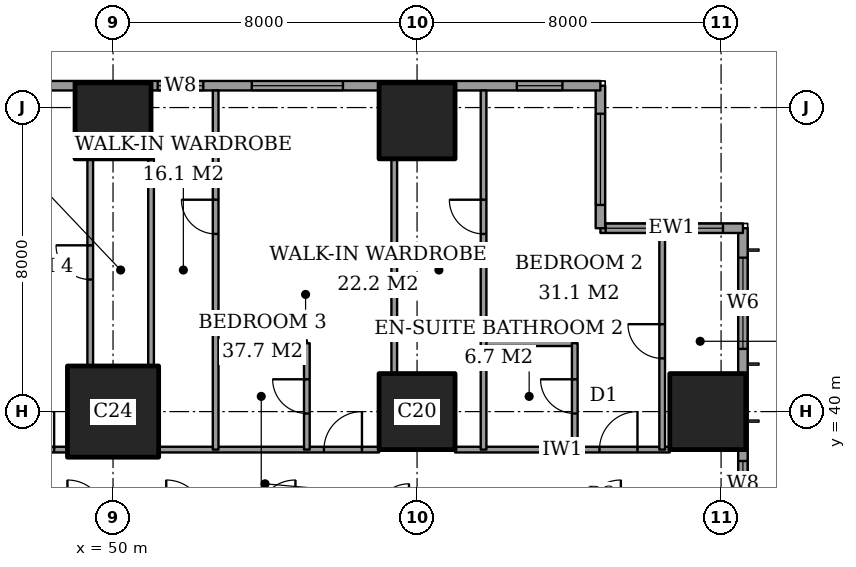
"""IFC4 building model, lengths in metres.
Left out: names, types, materials, properties, quantities, classifications, styles, units other than length and angle.
Written with IfcOpenShell. Run it as: python <this file> out.ifc"""

import sys

from ifc_helpers import new_model, si_unit, direction, frame, frame_2d, origin, origin_2d, place, context, subcontext, project, spatial, rectangle, extrude, element, fill, save


model = new_model("IFC4")
c1 = context("Model", 3, precision=1e-05, world=origin(), true_north=direction((0.0, 1.0)))
c2 = subcontext(c1, "Body", "Model", "MODEL_VIEW")
j1 = project(units=[si_unit("LENGTHUNIT", "METRE"), si_unit("PLANEANGLEUNIT", "RADIAN")], contexts=[c1])
p1 = place(None, origin())
s1 = spatial("IfcSite", under=j1, at=p1, CompositionType="ELEMENT")
p2 = place(p1, origin())
s2 = spatial("IfcBuilding", under=s1, at=p2, CompositionType="ELEMENT")
p3 = place(p2, frame((0.0, 0.0, 62.0)))
s3 = spatial("IfcBuildingStorey", under=s2, at=p3, CompositionType="ELEMENT", Elevation=62.0)
p4 = place(p3, frame((50.0, 40.0, 0.0), z_axis=(0.0, 0.0, 1.0), x_axis=(1.0, 0.0, 0.0)))
e1 = element("IfcColumn", 1, at=p4, inside=s3, PredefinedType="COLUMN", context=c2, shape_type="SweptSolid", body=[
    extrude(rectangle(XDim=2.4, YDim=2.4, at=origin_2d()), origin(), (0.0, 0.0, 1.0), 3.6),
])
for number, where, z_axis, x_axis in (
    (2, (50.0, 47.65, 0.0), (0.0, 0.0, 1.0), (1.0, 0.0, 0.0)),
    (3, (58.0, 40.0, 0.0), (0.0, 0.0, 1.0), (1.0, 0.0, 0.0)),
    (4, (58.0, 47.65, 0.0), (0.0, 0.0, 1.0), (1.0, 0.0, 0.0)),
    (5, (65.65, 40.0, 0.0), (0.0, 0.0, 1.0), (1.0, 0.0, 0.0)),
):
    element("IfcColumn", number, at=place(p3, frame(where, z_axis=z_axis, x_axis=x_axis)), inside=s3, PredefinedType="COLUMN", context=c2, shape_type="SweptSolid", body=[
        extrude(rectangle(XDim=2.0, YDim=2.0, at=origin_2d()), origin(), (0.0, 0.0, 1.0), 3.6),
    ])
p5 = place(p3, frame((66.575, 3.175, 0.0), z_axis=(0.0, 0.0, 1.0), x_axis=(0.0, 1.0, 0.0)))
e6 = element("IfcWall", 6, at=p5, inside=s3, PredefinedType="SOLIDWALL", context=c2, shape_type="SweptSolid", body=[
    extrude(rectangle(XDim=41.65, YDim=0.25, at=frame_2d((20.825, 0.0))), origin(), (0.0, 0.0, 1.0), 3.6),
])
p6 = place(p5, frame((0.775, 0.0, 0.6)))
e7 = element("IfcOpeningElement", 7, at=p6, cuts=e6, PredefinedType="OPENING", context=c2, shape_type="SweptSolid", body=[
    extrude(rectangle(XDim=2.4, YDim=2.0, at=frame_2d((1.2, 1.0))), frame((0.0, 0.135, 0.0), z_axis=(0.0, -1.0, 0.0), x_axis=(1.0, 0.0, 0.0)), (0.0, 0.0, 1.0), 0.27),
])
p7 = place(p5, frame((6.1, 0.0, 0.6)))
e8 = element("IfcOpeningElement", 8, at=p7, cuts=e6, PredefinedType="OPENING", context=c2, shape_type="SweptSolid", body=[
    extrude(rectangle(XDim=1.2, YDim=2.0, at=frame_2d((0.6, 1.0))), frame((0.0, 0.135, 0.0), z_axis=(0.0, -1.0, 0.0), x_axis=(1.0, 0.0, 0.0)), (0.0, 0.0, 1.0), 0.27),
])
p8 = place(p5, frame((8.275, 0.0, 0.6)))
e9 = element("IfcOpeningElement", 9, at=p8, cuts=e6, PredefinedType="OPENING", context=c2, shape_type="SweptSolid", body=[
    extrude(rectangle(XDim=2.4, YDim=2.0, at=frame_2d((1.2, 1.0))), frame((0.0, 0.135, 0.0), z_axis=(0.0, -1.0, 0.0), x_axis=(1.0, 0.0, 0.0)), (0.0, 0.0, 1.0), 0.27),
])
p9 = place(p5, frame((15.775, 0.0, 0.6)))
e10 = element("IfcOpeningElement", 10, at=p9, cuts=e6, PredefinedType="OPENING", context=c2, shape_type="SweptSolid", body=[
    extrude(rectangle(XDim=2.4, YDim=2.0, at=frame_2d((1.2, 1.0))), frame((0.0, 0.135, 0.0), z_axis=(0.0, -1.0, 0.0), x_axis=(1.0, 0.0, 0.0)), (0.0, 0.0, 1.0), 0.27),
])
p10 = place(p5, frame((23.475, 0.0, 0.6)))
e11 = element("IfcOpeningElement", 11, at=p10, cuts=e6, PredefinedType="OPENING", context=c2, shape_type="SweptSolid", body=[
    extrude(rectangle(XDim=2.4, YDim=2.0, at=frame_2d((1.2, 1.0))), frame((0.0, 0.135, 0.0), z_axis=(0.0, -1.0, 0.0), x_axis=(1.0, 0.0, 0.0)), (0.0, 0.0, 1.0), 0.27),
])
p11 = place(p5, frame((30.875, 0.0, 0.6)))
e12 = element("IfcOpeningElement", 12, at=p11, cuts=e6, PredefinedType="OPENING", context=c2, shape_type="SweptSolid", body=[
    extrude(rectangle(XDim=2.4, YDim=2.0, at=frame_2d((1.2, 1.0))), frame((0.0, 0.135, 0.0), z_axis=(0.0, -1.0, 0.0), x_axis=(1.0, 0.0, 0.0)), (0.0, 0.0, 1.0), 0.27),
])
p12 = place(p5, frame((34.325, 0.0, 0.6)))
e13 = element("IfcOpeningElement", 13, at=p12, cuts=e6, PredefinedType="OPENING", context=c2, shape_type="SweptSolid", body=[
    extrude(rectangle(XDim=1.2, YDim=2.0, at=frame_2d((0.6, 1.0))), frame((0.0, 0.135, 0.0), z_axis=(0.0, -1.0, 0.0), x_axis=(1.0, 0.0, 0.0)), (0.0, 0.0, 1.0), 0.27),
])
p13 = place(p5, frame((38.475, 0.0, 0.6)))
e14 = element("IfcOpeningElement", 14, at=p13, cuts=e6, PredefinedType="OPENING", context=c2, shape_type="SweptSolid", body=[
    extrude(rectangle(XDim=2.4, YDim=2.0, at=frame_2d((1.2, 1.0))), frame((0.0, 0.135, 0.0), z_axis=(0.0, -1.0, 0.0), x_axis=(1.0, 0.0, 0.0)), (0.0, 0.0, 1.0), 0.27),
])
p14 = place(p3, frame((66.575, 44.825, 0.0), z_axis=(0.0, 0.0, 1.0), x_axis=(-1.0, 0.0, 0.0)))
e15 = element("IfcWall", 15, at=p14, inside=s3, PredefinedType="SOLIDWALL", context=c2, shape_type="SweptSolid", body=[
    extrude(rectangle(XDim=3.75, YDim=0.25, at=frame_2d((1.875, 0.0))), origin(), (0.0, 0.0, 1.0), 3.6),
])
p15 = place(p14, frame((0.525, 0.0, 0.6)))
e16 = element("IfcOpeningElement", 16, at=p15, cuts=e15, PredefinedType="OPENING", context=c2, shape_type="SweptSolid", body=[
    extrude(rectangle(XDim=1.2, YDim=2.0, at=frame_2d((0.6, 1.0))), frame((0.0, 0.135, 0.0), z_axis=(0.0, -1.0, 0.0), x_axis=(1.0, 0.0, 0.0)), (0.0, 0.0, 1.0), 0.27),
])
p16 = place(p14, frame((2.413, 0.0, 0.6)))
e17 = element("IfcOpeningElement", 17, at=p16, cuts=e15, PredefinedType="OPENING", context=c2, shape_type="SweptSolid", body=[
    extrude(rectangle(XDim=1.2, YDim=2.0, at=frame_2d((0.6, 1.0))), frame((0.0, 0.135, 0.0), z_axis=(0.0, -1.0, 0.0), x_axis=(1.0, 0.0, 0.0)), (0.0, 0.0, 1.0), 0.27),
])
p17 = place(p3, frame((62.825, 44.825, 0.0), z_axis=(0.0, 0.0, 1.0), x_axis=(0.0, 1.0, 0.0)))
e18 = element("IfcWall", 18, at=p17, inside=s3, PredefinedType="SOLIDWALL", context=c2, shape_type="SweptSolid", body=[
    extrude(rectangle(XDim=3.75, YDim=0.25, at=frame_2d((1.875, 0.0))), origin(), (0.0, 0.0, 1.0), 3.6),
])
p18 = place(p17, frame((0.613, 0.0, 0.6)))
e19 = element("IfcOpeningElement", 19, at=p18, cuts=e18, PredefinedType="OPENING", context=c2, shape_type="SweptSolid", body=[
    extrude(rectangle(XDim=2.4, YDim=2.0, at=frame_2d((1.2, 1.0))), frame((0.0, 0.135, 0.0), z_axis=(0.0, -1.0, 0.0), x_axis=(1.0, 0.0, 0.0)), (0.0, 0.0, 1.0), 0.27),
])
p19 = place(p3, frame((62.825, 48.575, 0.0), z_axis=(0.0, 0.0, 1.0), x_axis=(-1.0, 0.0, 0.0)))
e20 = element("IfcWall", 20, at=p19, inside=s3, PredefinedType="SOLIDWALL", context=c2, shape_type="SweptSolid", body=[
    extrude(rectangle(XDim=21.4, YDim=0.25, at=frame_2d((10.7, 0.0))), origin(), (0.0, 0.0, 1.0), 3.6),
])
p20 = place(p19, frame((1.0, 0.0, 0.6)))
e21 = element("IfcOpeningElement", 21, at=p20, cuts=e20, PredefinedType="OPENING", context=c2, shape_type="SweptSolid", body=[
    extrude(rectangle(XDim=1.2, YDim=2.0, at=frame_2d((0.6, 1.0))), frame((0.0, 0.135, 0.0), z_axis=(0.0, -1.0, 0.0), x_axis=(1.0, 0.0, 0.0)), (0.0, 0.0, 1.0), 0.27),
])
p21 = place(p19, frame((6.775, 0.0, 0.6)))
e22 = element("IfcOpeningElement", 22, at=p21, cuts=e20, PredefinedType="OPENING", context=c2, shape_type="SweptSolid", body=[
    extrude(rectangle(XDim=2.4, YDim=2.0, at=frame_2d((1.2, 1.0))), frame((0.0, 0.135, 0.0), z_axis=(0.0, -1.0, 0.0), x_axis=(1.0, 0.0, 0.0)), (0.0, 0.0, 1.0), 0.27),
])
p22 = place(p19, frame((10.45, 0.0, 0.6)))
e23 = element("IfcOpeningElement", 23, at=p22, cuts=e20, PredefinedType="OPENING", context=c2, shape_type="SweptSolid", body=[
    extrude(rectangle(XDim=1.2, YDim=2.0, at=frame_2d((0.6, 1.0))), frame((0.0, 0.135, 0.0), z_axis=(0.0, -1.0, 0.0), x_axis=(1.0, 0.0, 0.0)), (0.0, 0.0, 1.0), 0.27),
])
p23 = place(p19, frame((14.475, 0.0, 0.6)))
e24 = element("IfcOpeningElement", 24, at=p23, cuts=e20, PredefinedType="OPENING", context=c2, shape_type="SweptSolid", body=[
    extrude(rectangle(XDim=2.4, YDim=2.0, at=frame_2d((1.2, 1.0))), frame((0.0, 0.135, 0.0), z_axis=(0.0, -1.0, 0.0), x_axis=(1.0, 0.0, 0.0)), (0.0, 0.0, 1.0), 0.27),
])
p24 = place(p19, frame((17.9, 0.0, 0.6)))
e25 = element("IfcOpeningElement", 25, at=p24, cuts=e20, PredefinedType="OPENING", context=c2, shape_type="SweptSolid", body=[
    extrude(rectangle(XDim=1.2, YDim=2.0, at=frame_2d((0.6, 1.0))), frame((0.0, 0.135, 0.0), z_axis=(0.0, -1.0, 0.0), x_axis=(1.0, 0.0, 0.0)), (0.0, 0.0, 1.0), 0.27),
])
p25 = place(p3, frame((43.35, 39.0, 0.0), z_axis=(0.0, 0.0, 1.0), x_axis=(1.0, 0.0, 0.0)))
e26 = element("IfcWall", 26, at=p25, inside=s3, PredefinedType="PARTITIONING", context=c2, shape_type="SweptSolid", body=[
    extrude(rectangle(XDim=5.45, YDim=0.15, at=frame_2d((2.725, 0.0))), origin(), (0.0, 0.0, 1.0), 3.35),
])
p26 = place(p25, frame((4.1, 0.0, 0.0)))
e27 = element("IfcOpeningElement", 27, at=p26, cuts=e26, PredefinedType="OPENING", context=c2, shape_type="SweptSolid", body=[
    extrude(rectangle(XDim=1.0, YDim=2.1, at=frame_2d((0.5, 1.05))), frame((0.0, 0.085, 0.0), z_axis=(0.0, -1.0, 0.0), x_axis=(1.0, 0.0, 0.0)), (0.0, 0.0, 1.0), 0.17),
])
p27 = place(p25, frame((0.475, 0.0, 0.0)))
e28 = element("IfcOpeningElement", 28, at=p27, cuts=e26, PredefinedType="OPENING", context=c2, shape_type="SweptSolid", body=[
    extrude(rectangle(XDim=1.0, YDim=2.1, at=frame_2d((0.5, 1.05))), frame((0.0, 0.085, 0.0), z_axis=(0.0, -1.0, 0.0), x_axis=(1.0, 0.0, 0.0)), (0.0, 0.0, 1.0), 0.17),
])
p28 = place(p3, frame((51.2, 39.0, 0.0), z_axis=(0.0, 0.0, 1.0), x_axis=(1.0, 0.0, 0.0)))
e29 = element("IfcWall", 29, at=p28, inside=s3, PredefinedType="PARTITIONING", context=c2, shape_type="SweptSolid", body=[
    extrude(rectangle(XDim=5.8, YDim=0.15, at=frame_2d((2.9, 0.0))), origin(), (0.0, 0.0, 1.0), 3.35),
])
p29 = place(p28, frame((4.35, 0.0, 0.0)))
e30 = element("IfcOpeningElement", 30, at=p29, cuts=e29, PredefinedType="OPENING", context=c2, shape_type="SweptSolid", body=[
    extrude(rectangle(XDim=1.0, YDim=2.1, at=frame_2d((0.5, 1.05))), frame((0.0, 0.085, 0.0), z_axis=(0.0, -1.0, 0.0), x_axis=(1.0, 0.0, 0.0)), (0.0, 0.0, 1.0), 0.17),
])
p30 = place(p3, frame((59.0, 39.0, 0.0), z_axis=(0.0, 0.0, 1.0), x_axis=(1.0, 0.0, 0.0)))
e31 = element("IfcWall", 31, at=p30, inside=s3, PredefinedType="PARTITIONING", context=c2, shape_type="SweptSolid", body=[
    extrude(rectangle(XDim=5.65, YDim=0.15, at=frame_2d((2.825, 0.0))), origin(), (0.0, 0.0, 1.0), 3.35),
])
p31 = place(p30, frame((3.8, 0.0, 0.0)))
e32 = element("IfcOpeningElement", 32, at=p31, cuts=e31, PredefinedType="OPENING", context=c2, shape_type="SweptSolid", body=[
    extrude(rectangle(XDim=1.0, YDim=2.1, at=frame_2d((0.5, 1.05))), frame((0.0, 0.085, 0.0), z_axis=(0.0, -1.0, 0.0), x_axis=(1.0, 0.0, 0.0)), (0.0, 0.0, 1.0), 0.17),
])
p32 = place(p3, frame((52.7, 41.8, 0.0), z_axis=(0.0, 0.0, 1.0), x_axis=(1.0, 0.0, 0.0)))
e33 = element("IfcWall", 33, at=p32, inside=s3, PredefinedType="PARTITIONING", context=c2, shape_type="SweptSolid", body=[
    extrude(rectangle(XDim=2.4, YDim=0.15, at=frame_2d((1.2, 0.0))), origin(), (0.0, 0.0, 1.0), 3.35),
])
p33 = place(p3, frame((59.75, 41.8, 0.0), z_axis=(0.0, 0.0, 1.0), x_axis=(1.0, 0.0, 0.0)))
e34 = element("IfcWall", 34, at=p33, inside=s3, PredefinedType="PARTITIONING", context=c2, shape_type="SweptSolid", body=[
    extrude(rectangle(XDim=2.4, YDim=0.15, at=frame_2d((1.2, 0.0))), origin(), (0.0, 0.0, 1.0), 3.35),
])
p34 = place(p3, frame((49.4, 41.2, 0.0), z_axis=(0.0, 0.0, 1.0), x_axis=(0.0, 1.0, 0.0)))
e35 = element("IfcWall", 35, at=p34, inside=s3, PredefinedType="PARTITIONING", context=c2, shape_type="SweptSolid", body=[
    extrude(rectangle(XDim=5.45, YDim=0.15, at=frame_2d((2.725, 0.0))), origin(), (0.0, 0.0, 1.0), 3.35),
])
p35 = place(p34, frame((2.275, 0.0, 0.0)))
e36 = element("IfcOpeningElement", 36, at=p35, cuts=e35, PredefinedType="OPENING", context=c2, shape_type="SweptSolid", body=[
    extrude(rectangle(XDim=0.9, YDim=2.1, at=frame_2d((0.45, 1.05))), frame((0.0, 0.085, 0.0), z_axis=(0.0, -1.0, 0.0), x_axis=(1.0, 0.0, 0.0)), (0.0, 0.0, 1.0), 0.17),
])
p36 = place(p3, frame((51.0, 41.2, 0.0), z_axis=(0.0, 0.0, 1.0), x_axis=(0.0, 1.0, 0.0)))
e37 = element("IfcWall", 37, at=p36, inside=s3, PredefinedType="PARTITIONING", context=c2, shape_type="SweptSolid", body=[
    extrude(rectangle(XDim=5.45, YDim=0.15, at=frame_2d((2.725, 0.0))), origin(), (0.0, 0.0, 1.0), 3.35),
])
p37 = place(p3, frame((52.7, 39.0, 0.0), z_axis=(0.0, 0.0, 1.0), x_axis=(0.0, 1.0, 0.0)))
e38 = element("IfcWall", 38, at=p37, inside=s3, PredefinedType="PARTITIONING", context=c2, shape_type="SweptSolid", body=[
    extrude(rectangle(XDim=9.45, YDim=0.15, at=frame_2d((4.725, 0.0))), origin(), (0.0, 0.0, 1.0), 3.35),
])
p38 = place(p37, frame((5.675, 0.0, 0.0)))
e39 = element("IfcOpeningElement", 39, at=p38, cuts=e38, PredefinedType="OPENING", context=c2, shape_type="SweptSolid", body=[
    extrude(rectangle(XDim=0.9, YDim=2.1, at=frame_2d((0.45, 1.05))), frame((0.0, 0.085, 0.0), z_axis=(0.0, -1.0, 0.0), x_axis=(1.0, 0.0, 0.0)), (0.0, 0.0, 1.0), 0.17),
])
p39 = place(p3, frame((55.1, 39.0, 0.0), z_axis=(0.0, 0.0, 1.0), x_axis=(0.0, 1.0, 0.0)))
e40 = element("IfcWall", 40, at=p39, inside=s3, PredefinedType="PARTITIONING", context=c2, shape_type="SweptSolid", body=[
    extrude(rectangle(XDim=2.8, YDim=0.15, at=frame_2d((1.4, 0.0))), origin(), (0.0, 0.0, 1.0), 3.35),
])
p40 = place(p39, frame((0.95, 0.0, 0.0)))
e41 = element("IfcOpeningElement", 41, at=p40, cuts=e40, PredefinedType="OPENING", context=c2, shape_type="SweptSolid", body=[
    extrude(rectangle(XDim=0.9, YDim=2.1, at=frame_2d((0.45, 1.05))), frame((0.0, 0.085, 0.0), z_axis=(0.0, -1.0, 0.0), x_axis=(1.0, 0.0, 0.0)), (0.0, 0.0, 1.0), 0.17),
])
p41 = place(p3, frame((57.4, 41.0, 0.0), z_axis=(0.0, 0.0, 1.0), x_axis=(0.0, 1.0, 0.0)))
e42 = element("IfcWall", 42, at=p41, inside=s3, PredefinedType="PARTITIONING", context=c2, shape_type="SweptSolid", body=[
    extrude(rectangle(XDim=5.65, YDim=0.15, at=frame_2d((2.825, 0.0))), origin(), (0.0, 0.0, 1.0), 3.35),
])
p42 = place(p3, frame((59.75, 39.0, 0.0), z_axis=(0.0, 0.0, 1.0), x_axis=(0.0, 1.0, 0.0)))
e43 = element("IfcWall", 43, at=p42, inside=s3, PredefinedType="PARTITIONING", context=c2, shape_type="SweptSolid", body=[
    extrude(rectangle(XDim=9.45, YDim=0.15, at=frame_2d((4.725, 0.0))), origin(), (0.0, 0.0, 1.0), 3.35),
])
p43 = place(p42, frame((5.675, 0.0, 0.0)))
e44 = element("IfcOpeningElement", 44, at=p43, cuts=e43, PredefinedType="OPENING", context=c2, shape_type="SweptSolid", body=[
    extrude(rectangle(XDim=0.9, YDim=2.1, at=frame_2d((0.45, 1.05))), frame((0.0, 0.085, 0.0), z_axis=(0.0, -1.0, 0.0), x_axis=(1.0, 0.0, 0.0)), (0.0, 0.0, 1.0), 0.17),
])
p44 = place(p3, frame((62.15, 39.0, 0.0), z_axis=(0.0, 0.0, 1.0), x_axis=(0.0, 1.0, 0.0)))
e45 = element("IfcWall", 45, at=p44, inside=s3, PredefinedType="PARTITIONING", context=c2, shape_type="SweptSolid", body=[
    extrude(rectangle(XDim=2.8, YDim=0.15, at=frame_2d((1.4, 0.0))), origin(), (0.0, 0.0, 1.0), 3.35),
])
p45 = place(p44, frame((0.95, 0.0, 0.0)))
e46 = element("IfcOpeningElement", 46, at=p45, cuts=e45, PredefinedType="OPENING", context=c2, shape_type="SweptSolid", body=[
    extrude(rectangle(XDim=0.9, YDim=2.1, at=frame_2d((0.45, 1.05))), frame((0.0, 0.085, 0.0), z_axis=(0.0, -1.0, 0.0), x_axis=(1.0, 0.0, 0.0)), (0.0, 0.0, 1.0), 0.17),
])
p46 = place(p3, frame((64.45, 39.0, 0.0), z_axis=(0.0, 0.0, 1.0), x_axis=(0.0, 1.0, 0.0)))
e47 = element("IfcWall", 47, at=p46, inside=s3, PredefinedType="PARTITIONING", context=c2, shape_type="SweptSolid", body=[
    extrude(rectangle(XDim=5.7, YDim=0.15, at=frame_2d((2.85, 0.0))), origin(), (0.0, 0.0, 1.0), 3.35),
])
p47 = place(p46, frame((2.4, 0.0, 0.0)))
e48 = element("IfcOpeningElement", 48, at=p47, cuts=e47, PredefinedType="OPENING", context=c2, shape_type="SweptSolid", body=[
    extrude(rectangle(XDim=0.9, YDim=2.1, at=frame_2d((0.45, 1.05))), frame((0.0, 0.085, 0.0), z_axis=(0.0, -1.0, 0.0), x_axis=(1.0, 0.0, 0.0)), (0.0, 0.0, 1.0), 0.17),
])
p48 = place(p12, origin())
e49 = element("IfcWindow", 49, at=p48, inside=s3, PartitioningType="SINGLE_PANEL", PredefinedType="WINDOW", context=c2, shape_type="SweptSolid", body=[
    extrude(rectangle(XDim=1.2, YDim=2.0, at=frame_2d((0.6, 1.0))), frame((0.0, 0.03, 0.0), z_axis=(0.0, -1.0, 0.0), x_axis=(1.0, 0.0, 0.0)), (0.0, 0.0, 1.0), 0.06),
])
fill(e13, e49)
p49 = place(p13, origin())
e50 = element("IfcWindow", 50, at=p49, inside=s3, PartitioningType="SINGLE_PANEL", PredefinedType="WINDOW", context=c2, shape_type="SweptSolid", body=[
    extrude(rectangle(XDim=2.4, YDim=2.0, at=frame_2d((1.2, 1.0))), frame((0.0, 0.03, 0.0), z_axis=(0.0, -1.0, 0.0), x_axis=(1.0, 0.0, 0.0)), (0.0, 0.0, 1.0), 0.06),
])
fill(e14, e50)
p50 = place(p15, origin())
e51 = element("IfcWindow", 51, at=p50, inside=s3, PartitioningType="SINGLE_PANEL", PredefinedType="WINDOW", context=c2, shape_type="SweptSolid", body=[
    extrude(rectangle(XDim=1.2, YDim=2.0, at=frame_2d((0.6, 1.0))), frame((0.0, 0.03, 0.0), z_axis=(0.0, -1.0, 0.0), x_axis=(1.0, 0.0, 0.0)), (0.0, 0.0, 1.0), 0.06),
])
fill(e16, e51)
p51 = place(p16, origin())
e52 = element("IfcWindow", 52, at=p51, inside=s3, PartitioningType="SINGLE_PANEL", PredefinedType="WINDOW", context=c2, shape_type="SweptSolid", body=[
    extrude(rectangle(XDim=1.2, YDim=2.0, at=frame_2d((0.6, 1.0))), frame((0.0, 0.03, 0.0), z_axis=(0.0, -1.0, 0.0), x_axis=(1.0, 0.0, 0.0)), (0.0, 0.0, 1.0), 0.06),
])
fill(e17, e52)
p52 = place(p18, origin())
e53 = element("IfcWindow", 53, at=p52, inside=s3, PartitioningType="SINGLE_PANEL", PredefinedType="WINDOW", context=c2, shape_type="SweptSolid", body=[
    extrude(rectangle(XDim=2.4, YDim=2.0, at=frame_2d((1.2, 1.0))), frame((0.0, 0.03, 0.0), z_axis=(0.0, -1.0, 0.0), x_axis=(1.0, 0.0, 0.0)), (0.0, 0.0, 1.0), 0.06),
])
fill(e19, e53)
p53 = place(p20, origin())
e54 = element("IfcWindow", 54, at=p53, inside=s3, PartitioningType="SINGLE_PANEL", PredefinedType="WINDOW", context=c2, shape_type="SweptSolid", body=[
    extrude(rectangle(XDim=1.2, YDim=2.0, at=frame_2d((0.6, 1.0))), frame((0.0, 0.03, 0.0), z_axis=(0.0, -1.0, 0.0), x_axis=(1.0, 0.0, 0.0)), (0.0, 0.0, 1.0), 0.06),
])
fill(e21, e54)
p54 = place(p21, origin())
e55 = element("IfcWindow", 55, at=p54, inside=s3, PartitioningType="SINGLE_PANEL", PredefinedType="WINDOW", context=c2, shape_type="SweptSolid", body=[
    extrude(rectangle(XDim=2.4, YDim=2.0, at=frame_2d((1.2, 1.0))), frame((0.0, 0.03, 0.0), z_axis=(0.0, -1.0, 0.0), x_axis=(1.0, 0.0, 0.0)), (0.0, 0.0, 1.0), 0.06),
])
fill(e22, e55)
p55 = place(p22, origin())
e56 = element("IfcWindow", 56, at=p55, inside=s3, PartitioningType="SINGLE_PANEL", PredefinedType="WINDOW", context=c2, shape_type="SweptSolid", body=[
    extrude(rectangle(XDim=1.2, YDim=2.0, at=frame_2d((0.6, 1.0))), frame((0.0, 0.03, 0.0), z_axis=(0.0, -1.0, 0.0), x_axis=(1.0, 0.0, 0.0)), (0.0, 0.0, 1.0), 0.06),
])
fill(e23, e56)
p56 = place(p47, origin())
e57 = element("IfcDoor", 57, at=p56, inside=s3, OperationType="SINGLE_SWING_LEFT", PredefinedType="DOOR", context=c2, shape_type="SweptSolid", body=[
    extrude(rectangle(XDim=0.9, YDim=2.1, at=frame_2d((0.45, 1.05))), frame((0.0, 0.025, 0.0), z_axis=(0.0, -1.0, 0.0), x_axis=(1.0, 0.0, 0.0)), (0.0, 0.0, 1.0), 0.05),
])
fill(e48, e57)
p57 = place(p45, origin())
e58 = element("IfcDoor", 58, at=p57, inside=s3, OperationType="SINGLE_SWING_LEFT", PredefinedType="DOOR", context=c2, shape_type="SweptSolid", body=[
    extrude(rectangle(XDim=0.9, YDim=2.1, at=frame_2d((0.45, 1.05))), frame((0.0, 0.025, 0.0), z_axis=(0.0, -1.0, 0.0), x_axis=(1.0, 0.0, 0.0)), (0.0, 0.0, 1.0), 0.05),
])
fill(e46, e58)
p58 = place(p31, origin())
e59 = element("IfcDoor", 59, at=p58, inside=s3, OperationType="SINGLE_SWING_LEFT", PredefinedType="DOOR", context=c2, shape_type="SweptSolid", body=[
    extrude(rectangle(XDim=1.0, YDim=2.1, at=frame_2d((0.5, 1.05))), frame((0.0, 0.025, 0.0), z_axis=(0.0, -1.0, 0.0), x_axis=(1.0, 0.0, 0.0)), (0.0, 0.0, 1.0), 0.05),
])
fill(e32, e59)
p59 = place(p43, origin())
e60 = element("IfcDoor", 60, at=p59, inside=s3, OperationType="SINGLE_SWING_LEFT", PredefinedType="DOOR", context=c2, shape_type="SweptSolid", body=[
    extrude(rectangle(XDim=0.9, YDim=2.1, at=frame_2d((0.45, 1.05))), frame((0.0, 0.025, 0.0), z_axis=(0.0, -1.0, 0.0), x_axis=(1.0, 0.0, 0.0)), (0.0, 0.0, 1.0), 0.05),
])
fill(e44, e60)
p60 = place(p40, origin())
e61 = element("IfcDoor", 61, at=p60, inside=s3, OperationType="SINGLE_SWING_LEFT", PredefinedType="DOOR", context=c2, shape_type="SweptSolid", body=[
    extrude(rectangle(XDim=0.9, YDim=2.1, at=frame_2d((0.45, 1.05))), frame((0.0, 0.025, 0.0), z_axis=(0.0, -1.0, 0.0), x_axis=(1.0, 0.0, 0.0)), (0.0, 0.0, 1.0), 0.05),
])
fill(e41, e61)
p61 = place(p29, origin())
e62 = element("IfcDoor", 62, at=p61, inside=s3, OperationType="SINGLE_SWING_LEFT", PredefinedType="DOOR", context=c2, shape_type="SweptSolid", body=[
    extrude(rectangle(XDim=1.0, YDim=2.1, at=frame_2d((0.5, 1.05))), frame((0.0, 0.025, 0.0), z_axis=(0.0, -1.0, 0.0), x_axis=(1.0, 0.0, 0.0)), (0.0, 0.0, 1.0), 0.05),
])
fill(e30, e62)
p62 = place(p38, origin())
e63 = element("IfcDoor", 63, at=p62, inside=s3, OperationType="SINGLE_SWING_LEFT", PredefinedType="DOOR", context=c2, shape_type="SweptSolid", body=[
    extrude(rectangle(XDim=0.9, YDim=2.1, at=frame_2d((0.45, 1.05))), frame((0.0, 0.025, 0.0), z_axis=(0.0, -1.0, 0.0), x_axis=(1.0, 0.0, 0.0)), (0.0, 0.0, 1.0), 0.05),
])
fill(e39, e63)
p63 = place(p35, origin())
e64 = element("IfcDoor", 64, at=p63, inside=s3, OperationType="SINGLE_SWING_LEFT", PredefinedType="DOOR", context=c2, shape_type="SweptSolid", body=[
    extrude(rectangle(XDim=0.9, YDim=2.1, at=frame_2d((0.45, 1.05))), frame((0.0, 0.025, 0.0), z_axis=(0.0, -1.0, 0.0), x_axis=(1.0, 0.0, 0.0)), (0.0, 0.0, 1.0), 0.05),
])
fill(e36, e64)
p64 = place(p26, origin())
e65 = element("IfcDoor", 65, at=p64, inside=s3, OperationType="SINGLE_SWING_LEFT", PredefinedType="DOOR", context=c2, shape_type="SweptSolid", body=[
    extrude(rectangle(XDim=1.0, YDim=2.1, at=frame_2d((0.5, 1.05))), frame((0.0, 0.025, 0.0), z_axis=(0.0, -1.0, 0.0), x_axis=(1.0, 0.0, 0.0)), (0.0, 0.0, 1.0), 0.05),
])
fill(e27, e65)
save(model, sys.argv[1])
